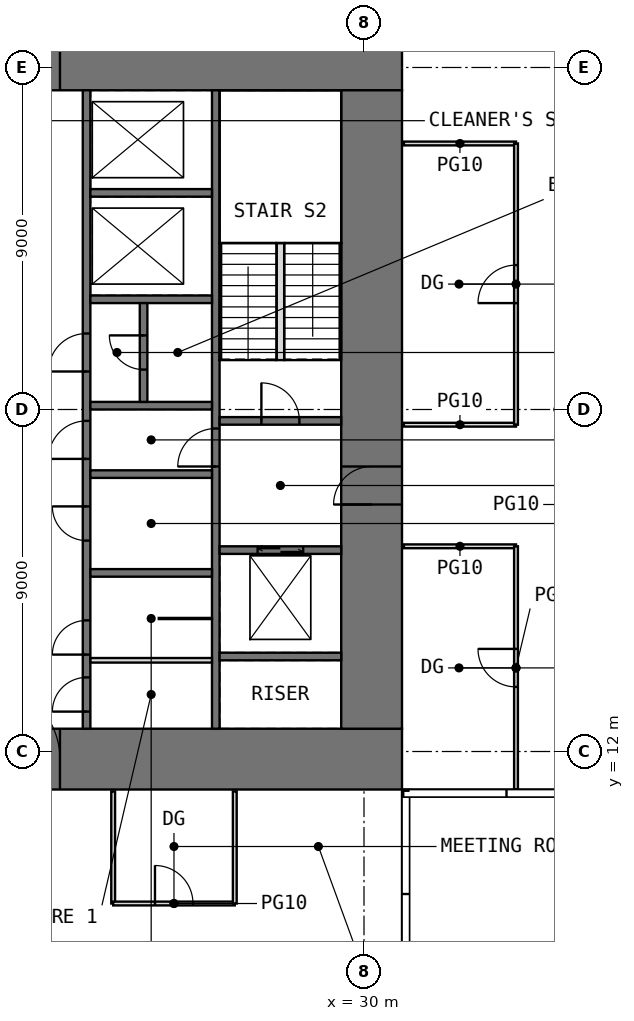
"""IFC4 building model, lengths in metres.
Left out: names, types, materials, properties, quantities, classifications, styles, units other than length and angle.
Written with IfcOpenShell. Run it as: python <this file> out.ifc"""

import sys

from ifc_helpers import new_model, si_unit, direction, frame, frame_2d, origin, place, context, subcontext, project, spatial, rectangle, extrude, element, fill, save


model = new_model("IFC4")
c1 = context("Model", 3, precision=1e-05, world=origin(), true_north=direction((0.0, 1.0)))
c2 = subcontext(c1, "Body", "Model", "MODEL_VIEW")
j1 = project(units=[si_unit("LENGTHUNIT", "METRE"), si_unit("PLANEANGLEUNIT", "RADIAN")], contexts=[c1])
p1 = place(None, origin())
s1 = spatial("IfcSite", under=j1, at=p1, CompositionType="ELEMENT")
p2 = place(p1, origin())
s2 = spatial("IfcBuilding", under=s1, at=p2, CompositionType="ELEMENT")
p3 = place(p2, frame((0.0, 0.0, 136.5)))
s3 = spatial("IfcBuildingStorey", under=s2, at=p3, CompositionType="ELEMENT", Elevation=136.5)
p4 = place(p3, frame((11.0, 11.8, -0.05), z_axis=(0.0, 0.0, 1.0), x_axis=(1.0, 0.0, 0.0)))
e1 = element("IfcWall", 1, at=p4, inside=s3, PredefinedType="SHEAR", context=c2, shape_type="SweptSolid", body=[
    extrude(rectangle(XDim=20.0, YDim=1.6, at=frame_2d((10.0, 0.0))), origin(), (0.0, 0.0, 1.0), 4.0),
])
p5 = place(p4, frame((9.0, 0.0, 0.05)))
e2 = element("IfcOpeningElement", 2, at=p5, cuts=e1, PredefinedType="OPENING", context=c2, shape_type="SweptSolid", body=[
    extrude(rectangle(XDim=2.0, YDim=2.2, at=frame_2d((1.0, 1.1))), frame((0.0, 0.81, 0.0), z_axis=(0.0, -1.0, 0.0), x_axis=(1.0, 0.0, 0.0)), (0.0, 0.0, 1.0), 1.62),
])
p6 = place(p3, frame((11.0, 30.2, -0.05), z_axis=(0.0, 0.0, 1.0), x_axis=(1.0, 0.0, 0.0)))
e3 = element("IfcWall", 3, at=p6, inside=s3, PredefinedType="SHEAR", context=c2, shape_type="SweptSolid", body=[
    extrude(rectangle(XDim=20.0, YDim=1.6, at=frame_2d((10.0, 0.0))), origin(), (0.0, 0.0, 1.0), 4.0),
])
p7 = place(p6, frame((9.0, 0.0, 0.05)))
e4 = element("IfcOpeningElement", 4, at=p7, cuts=e3, PredefinedType="OPENING", context=c2, shape_type="SweptSolid", body=[
    extrude(rectangle(XDim=2.0, YDim=2.2, at=frame_2d((1.0, 1.1))), frame((0.0, 0.81, 0.0), z_axis=(0.0, -1.0, 0.0), x_axis=(1.0, 0.0, 0.0)), (0.0, 0.0, 1.0), 1.62),
])
p8 = place(p3, frame((30.2, 12.6, -0.05), z_axis=(0.0, 0.0, 1.0), x_axis=(0.0, 1.0, 0.0)))
e5 = element("IfcWall", 5, at=p8, inside=s3, PredefinedType="SHEAR", context=c2, shape_type="SweptSolid", body=[
    extrude(rectangle(XDim=16.8, YDim=1.6, at=frame_2d((8.4, 0.0))), origin(), (0.0, 0.0, 1.0), 4.0),
])
p9 = place(p8, frame((5.9, 0.0, 0.05)))
e6 = element("IfcOpeningElement", 6, at=p9, cuts=e5, PredefinedType="OPENING", context=c2, shape_type="SweptSolid", body=[
    extrude(rectangle(XDim=1.0, YDim=2.2, at=frame_2d((0.5, 1.1))), frame((0.0, 0.81, 0.0), z_axis=(0.0, -1.0, 0.0), x_axis=(1.0, 0.0, 0.0)), (0.0, 0.0, 1.0), 1.62),
])
p10 = place(p3, frame((22.7, 12.6, -0.05), z_axis=(0.0, 0.0, 1.0), x_axis=(0.0, 1.0, 0.0)))
e7 = element("IfcWall", 7, at=p10, inside=s3, PredefinedType="SHEAR", context=c2, shape_type="SweptSolid", body=[
    extrude(rectangle(XDim=16.8, YDim=0.2, at=frame_2d((8.4, 0.0))), origin(), (0.0, 0.0, 1.0), 4.0),
])
p11 = place(p10, frame((0.45, 0.0, 0.05)))
e8 = element("IfcOpeningElement", 8, at=p11, cuts=e7, PredefinedType="OPENING", context=c2, shape_type="SweptSolid", body=[
    extrude(rectangle(XDim=0.9, YDim=2.2, at=frame_2d((0.45, 1.1))), frame((0.0, 0.11, 0.0), z_axis=(0.0, -1.0, 0.0), x_axis=(1.0, 0.0, 0.0)), (0.0, 0.0, 1.0), 0.22),
])
p12 = place(p10, frame((7.1, 0.0, 0.05)))
e9 = element("IfcOpeningElement", 9, at=p12, cuts=e7, PredefinedType="OPENING", context=c2, shape_type="SweptSolid", body=[
    extrude(rectangle(XDim=1.0, YDim=2.2, at=frame_2d((0.5, 1.1))), frame((0.0, 0.11, 0.0), z_axis=(0.0, -1.0, 0.0), x_axis=(1.0, 0.0, 0.0)), (0.0, 0.0, 1.0), 0.22),
])
p13 = place(p10, frame((1.95, 0.0, 0.05)))
e10 = element("IfcOpeningElement", 10, at=p13, cuts=e7, PredefinedType="OPENING", context=c2, shape_type="SweptSolid", body=[
    extrude(rectangle(XDim=0.9, YDim=2.2, at=frame_2d((0.45, 1.1))), frame((0.0, 0.11, 0.0), z_axis=(0.0, -1.0, 0.0), x_axis=(1.0, 0.0, 0.0)), (0.0, 0.0, 1.0), 0.22),
])
p14 = place(p10, frame((4.95, 0.0, 0.05)))
e11 = element("IfcOpeningElement", 11, at=p14, cuts=e7, PredefinedType="OPENING", context=c2, shape_type="SweptSolid", body=[
    extrude(rectangle(XDim=0.9, YDim=2.2, at=frame_2d((0.45, 1.1))), frame((0.0, 0.11, 0.0), z_axis=(0.0, -1.0, 0.0), x_axis=(1.0, 0.0, 0.0)), (0.0, 0.0, 1.0), 0.22),
])
p15 = place(p10, frame((9.4, 0.0, 0.05)))
e12 = element("IfcOpeningElement", 12, at=p15, cuts=e7, PredefinedType="OPENING", context=c2, shape_type="SweptSolid", body=[
    extrude(rectangle(XDim=1.0, YDim=2.2, at=frame_2d((0.5, 1.1))), frame((0.0, 0.11, 0.0), z_axis=(0.0, -1.0, 0.0), x_axis=(1.0, 0.0, 0.0)), (0.0, 0.0, 1.0), 0.22),
])
p16 = place(p3, frame((26.1, 12.6, -0.05), z_axis=(0.0, 0.0, 1.0), x_axis=(0.0, 1.0, 0.0)))
e13 = element("IfcWall", 13, at=p16, inside=s3, PredefinedType="SHEAR", context=c2, shape_type="SweptSolid", body=[
    extrude(rectangle(XDim=16.8, YDim=0.2, at=frame_2d((8.4, 0.0))), origin(), (0.0, 0.0, 1.0), 4.0),
])
p17 = place(p16, frame((6.9, 0.0, 0.05)))
e14 = element("IfcOpeningElement", 14, at=p17, cuts=e13, PredefinedType="OPENING", context=c2, shape_type="SweptSolid", body=[
    extrude(rectangle(XDim=1.0, YDim=2.2, at=frame_2d((0.5, 1.1))), frame((0.0, 0.11, 0.0), z_axis=(0.0, -1.0, 0.0), x_axis=(1.0, 0.0, 0.0)), (0.0, 0.0, 1.0), 0.22),
])
for number, where, z_axis, x_axis in (
    (15, (22.8, 16.7, -0.05), (0.0, 0.0, 1.0), (1.0, 0.0, 0.0)),
    (16, (22.8, 19.3, -0.05), (0.0, 0.0, 1.0), (1.0, 0.0, 0.0)),
    (17, (22.8, 21.1, -0.05), (0.0, 0.0, 1.0), (1.0, 0.0, 0.0)),
    (18, (22.8, 23.9, -0.05), (0.0, 0.0, 1.0), (1.0, 0.0, 0.0)),
    (19, (22.8, 26.7, -0.05), (0.0, 0.0, 1.0), (1.0, 0.0, 0.0)),
    (20, (26.2, 14.5, -0.05), (0.0, 0.0, 1.0), (1.0, 0.0, 0.0)),
):
    element("IfcWall", number, at=place(p3, frame(where, z_axis=z_axis, x_axis=x_axis)), inside=s3, PredefinedType="SHEAR", context=c2, shape_type="SweptSolid", body=[
        extrude(rectangle(XDim=3.2, YDim=0.2, at=frame_2d((1.6, 0.0))), origin(), (0.0, 0.0, 1.0), 4.0),
    ])
p18 = place(p3, frame((26.2, 17.3, -0.05), z_axis=(0.0, 0.0, 1.0), x_axis=(1.0, 0.0, 0.0)))
e21 = element("IfcWall", 21, at=p18, inside=s3, PredefinedType="SHEAR", context=c2, shape_type="SweptSolid", body=[
    extrude(rectangle(XDim=3.2, YDim=0.2, at=frame_2d((1.6, 0.0))), origin(), (0.0, 0.0, 1.0), 4.0),
])
p19 = place(p18, frame((1.0, 0.0, 0.05)))
e22 = element("IfcOpeningElement", 22, at=p19, cuts=e21, PredefinedType="OPENING", context=c2, shape_type="SweptSolid", body=[
    extrude(rectangle(XDim=1.2, YDim=2.2, at=frame_2d((0.6, 1.1))), frame((0.0, 0.11, 0.0), z_axis=(0.0, -1.0, 0.0), x_axis=(1.0, 0.0, 0.0)), (0.0, 0.0, 1.0), 0.22),
])
p20 = place(p3, frame((26.2, 20.7, -0.05), z_axis=(0.0, 0.0, 1.0), x_axis=(1.0, 0.0, 0.0)))
e23 = element("IfcWall", 23, at=p20, inside=s3, PredefinedType="SHEAR", context=c2, shape_type="SweptSolid", body=[
    extrude(rectangle(XDim=3.2, YDim=0.2, at=frame_2d((1.6, 0.0))), origin(), (0.0, 0.0, 1.0), 4.0),
])
p21 = place(p20, frame((1.1, 0.0, 0.05)))
e24 = element("IfcOpeningElement", 24, at=p21, cuts=e23, PredefinedType="OPENING", context=c2, shape_type="SweptSolid", body=[
    extrude(rectangle(XDim=1.0, YDim=2.2, at=frame_2d((0.5, 1.1))), frame((0.0, 0.11, 0.0), z_axis=(0.0, -1.0, 0.0), x_axis=(1.0, 0.0, 0.0)), (0.0, 0.0, 1.0), 0.22),
])
p22 = place(p3, frame((22.8, 14.4, 0.0), z_axis=(0.0, 0.0, 1.0), x_axis=(1.0, 0.0, 0.0)))
e25 = element("IfcWall", 25, at=p22, inside=s3, PredefinedType="PARTITIONING", context=c2, shape_type="SweptSolid", body=[
    extrude(rectangle(XDim=3.2, YDim=0.12, at=frame_2d((1.6, 0.0))), origin(), (0.0, 0.0, 1.0), 3.75),
])
p23 = place(p3, frame((24.6, 15.5, 0.0), z_axis=(0.0, 0.0, 1.0), x_axis=(1.0, 0.0, 0.0)))
e26 = element("IfcWall", 26, at=p23, inside=s3, PredefinedType="PARTITIONING", context=c2, shape_type="SweptSolid", body=[
    extrude(rectangle(XDim=1.4, YDim=0.03, at=frame_2d((0.7, 0.0))), origin(), (0.0, 0.0, 1.0), 3.75),
])
p24 = place(p3, frame((24.2, 21.2, -0.05), z_axis=(0.0, 0.0, 1.0), x_axis=(0.0, 1.0, 0.0)))
e27 = element("IfcWall", 27, at=p24, inside=s3, PredefinedType="SHEAR", context=c2, shape_type="SweptSolid", body=[
    extrude(rectangle(XDim=2.6, YDim=0.2, at=frame_2d((1.3, 0.0))), origin(), (0.0, 0.0, 1.0), 4.0),
])
p25 = place(p24, frame((0.85, 0.0, 0.05)))
e28 = element("IfcOpeningElement", 28, at=p25, cuts=e27, PredefinedType="OPENING", context=c2, shape_type="SweptSolid", body=[
    extrude(rectangle(XDim=0.9, YDim=2.2, at=frame_2d((0.45, 1.1))), frame((0.0, 0.11, 0.0), z_axis=(0.0, -1.0, 0.0), x_axis=(1.0, 0.0, 0.0)), (0.0, 0.0, 1.0), 0.22),
])
p26 = place(p3, frame((23.4, 8.0, 0.0), z_axis=(0.0, 0.0, 1.0), x_axis=(0.0, 1.0, 0.0)))
e29 = element("IfcWall", 29, at=p26, inside=s3, PredefinedType="PARTITIONING", context=c2, shape_type="SweptSolid", body=[
    extrude(rectangle(XDim=2.95, YDim=0.1, at=frame_2d((1.475, 0.0))), origin(), (0.0, 0.0, 1.0), 3.75),
])
p27 = place(p3, frame((23.4, 8.0, 0.0), z_axis=(0.0, 0.0, 1.0), x_axis=(1.0, 0.0, 0.0)))
e30 = element("IfcWall", 30, at=p27, inside=s3, PredefinedType="PARTITIONING", context=c2, shape_type="SweptSolid", body=[
    extrude(rectangle(XDim=3.2, YDim=0.1, at=frame_2d((1.6, 0.0))), origin(), (0.0, 0.0, 1.0), 3.75),
])
p28 = place(p27, frame((1.1, 0.0, 0.0)))
e31 = element("IfcOpeningElement", 31, at=p28, cuts=e30, PredefinedType="OPENING", context=c2, shape_type="SweptSolid", body=[
    extrude(rectangle(XDim=1.0, YDim=2.4, at=frame_2d((0.5, 1.2))), frame((0.0, 0.06, 0.0), z_axis=(0.0, -1.0, 0.0), x_axis=(1.0, 0.0, 0.0)), (0.0, 0.0, 1.0), 0.12),
])
for number, where, z_axis, x_axis in (
    (32, (26.6, 8.0, 0.0), (0.0, 0.0, 1.0), (0.0, 1.0, 0.0)),
    (33, (31.05, 17.4, 0.0), (0.0, 0.0, 1.0), (1.0, 0.0, 0.0)),
    (34, (31.05, 20.6, 0.0), (0.0, 0.0, 1.0), (1.0, 0.0, 0.0)),
    (35, (31.05, 28.0, 0.0), (0.0, 0.0, 1.0), (1.0, 0.0, 0.0)),
):
    element("IfcWall", number, at=place(p3, frame(where, z_axis=z_axis, x_axis=x_axis)), inside=s3, PredefinedType="PARTITIONING", context=c2, shape_type="SweptSolid", body=[
        extrude(rectangle(XDim=2.95, YDim=0.1, at=frame_2d((1.475, 0.0))), origin(), (0.0, 0.0, 1.0), 3.75),
    ])
p29 = place(p3, frame((34.0, 11.0, 0.0), z_axis=(0.0, 0.0, 1.0), x_axis=(0.0, 1.0, 0.0)))
e36 = element("IfcWall", 36, at=p29, inside=s3, PredefinedType="PARTITIONING", context=c2, shape_type="SweptSolid", body=[
    extrude(rectangle(XDim=6.4, YDim=0.1, at=frame_2d((3.2, 0.0))), origin(), (0.0, 0.0, 1.0), 3.75),
])
p30 = place(p29, frame((2.7, 0.0, 0.0)))
e37 = element("IfcOpeningElement", 37, at=p30, cuts=e36, PredefinedType="OPENING", context=c2, shape_type="SweptSolid", body=[
    extrude(rectangle(XDim=1.0, YDim=2.4, at=frame_2d((0.5, 1.2))), frame((0.0, 0.06, 0.0), z_axis=(0.0, -1.0, 0.0), x_axis=(1.0, 0.0, 0.0)), (0.0, 0.0, 1.0), 0.12),
])
p31 = place(p3, frame((34.0, 20.6, 0.0), z_axis=(0.0, 0.0, 1.0), x_axis=(0.0, 1.0, 0.0)))
e38 = element("IfcWall", 38, at=p31, inside=s3, PredefinedType="PARTITIONING", context=c2, shape_type="SweptSolid", body=[
    extrude(rectangle(XDim=7.4, YDim=0.1, at=frame_2d((3.7, 0.0))), origin(), (0.0, 0.0, 1.0), 3.75),
])
p32 = place(p31, frame((3.2, 0.0, 0.0)))
e39 = element("IfcOpeningElement", 39, at=p32, cuts=e38, PredefinedType="OPENING", context=c2, shape_type="SweptSolid", body=[
    extrude(rectangle(XDim=1.0, YDim=2.4, at=frame_2d((0.5, 1.2))), frame((0.0, 0.06, 0.0), z_axis=(0.0, -1.0, 0.0), x_axis=(1.0, 0.0, 0.0)), (0.0, 0.0, 1.0), 0.12),
])
p33 = place(p3, frame((27.8, 22.3, 0.0), z_axis=(0.0, 0.0, 1.0), x_axis=(0.0, 1.0, 0.0)))
e40 = element("IfcWall", 40, at=p33, inside=s3, PredefinedType="PARTITIONING", context=c2, shape_type="SweptSolid", body=[
    extrude(rectangle(XDim=3.08, YDim=0.2, at=frame_2d((1.54, 0.0))), origin(), (0.0, 0.0, 1.0), 4.0),
])
p34 = place(p5, origin())
e41 = element("IfcDoor", 41, at=p34, inside=s3, OperationType="DOUBLE_DOOR_SINGLE_SWING", PredefinedType="DOOR", context=c2, shape_type="SweptSolid", body=[
    extrude(rectangle(XDim=2.0, YDim=2.2, at=frame_2d((1.0, 1.1))), frame((0.0, 0.025, 0.0), z_axis=(0.0, -1.0, 0.0), x_axis=(1.0, 0.0, 0.0)), (0.0, 0.0, 1.0), 0.05),
])
fill(e2, e41)
p35 = place(p7, origin())
e42 = element("IfcDoor", 42, at=p35, inside=s3, OperationType="DOUBLE_DOOR_SINGLE_SWING", PredefinedType="DOOR", context=c2, shape_type="SweptSolid", body=[
    extrude(rectangle(XDim=2.0, YDim=2.2, at=frame_2d((1.0, 1.1))), frame((0.0, 0.025, 0.0), z_axis=(0.0, -1.0, 0.0), x_axis=(1.0, 0.0, 0.0)), (0.0, 0.0, 1.0), 0.05),
])
fill(e4, e42)
p36 = place(p11, origin())
e43 = element("IfcDoor", 43, at=p36, inside=s3, OperationType="SINGLE_SWING_LEFT", PredefinedType="DOOR", context=c2, shape_type="SweptSolid", body=[
    extrude(rectangle(XDim=0.9, YDim=2.2, at=frame_2d((0.45, 1.1))), frame((0.0, 0.025, 0.0), z_axis=(0.0, -1.0, 0.0), x_axis=(1.0, 0.0, 0.0)), (0.0, 0.0, 1.0), 0.05),
])
fill(e8, e43)
p37 = place(p9, origin())
e44 = element("IfcDoor", 44, at=p37, inside=s3, OperationType="SINGLE_SWING_LEFT", PredefinedType="DOOR", context=c2, shape_type="SweptSolid", body=[
    extrude(rectangle(XDim=1.0, YDim=2.2, at=frame_2d((0.5, 1.1))), frame((0.0, 0.025, 0.0), z_axis=(0.0, -1.0, 0.0), x_axis=(1.0, 0.0, 0.0)), (0.0, 0.0, 1.0), 0.05),
])
fill(e6, e44)
p38 = place(p21, origin())
e45 = element("IfcDoor", 45, at=p38, inside=s3, OperationType="SINGLE_SWING_LEFT", PredefinedType="DOOR", context=c2, shape_type="SweptSolid", body=[
    extrude(rectangle(XDim=1.0, YDim=2.2, at=frame_2d((0.5, 1.1))), frame((0.0, 0.025, 0.0), z_axis=(0.0, -1.0, 0.0), x_axis=(1.0, 0.0, 0.0)), (0.0, 0.0, 1.0), 0.05),
])
fill(e24, e45)
p39 = place(p17, origin())
e46 = element("IfcDoor", 46, at=p39, inside=s3, OperationType="SINGLE_SWING_LEFT", PredefinedType="DOOR", context=c2, shape_type="SweptSolid", body=[
    extrude(rectangle(XDim=1.0, YDim=2.2, at=frame_2d((0.5, 1.1))), frame((0.0, 0.025, 0.0), z_axis=(0.0, -1.0, 0.0), x_axis=(1.0, 0.0, 0.0)), (0.0, 0.0, 1.0), 0.05),
])
fill(e14, e46)
p40 = place(p12, origin())
e47 = element("IfcDoor", 47, at=p40, inside=s3, OperationType="SINGLE_SWING_LEFT", PredefinedType="DOOR", context=c2, shape_type="SweptSolid", body=[
    extrude(rectangle(XDim=1.0, YDim=2.2, at=frame_2d((0.5, 1.1))), frame((0.0, 0.025, 0.0), z_axis=(0.0, -1.0, 0.0), x_axis=(1.0, 0.0, 0.0)), (0.0, 0.0, 1.0), 0.05),
])
fill(e9, e47)
p41 = place(p13, origin())
e48 = element("IfcDoor", 48, at=p41, inside=s3, OperationType="SINGLE_SWING_LEFT", PredefinedType="DOOR", context=c2, shape_type="SweptSolid", body=[
    extrude(rectangle(XDim=0.9, YDim=2.2, at=frame_2d((0.45, 1.1))), frame((0.0, 0.025, 0.0), z_axis=(0.0, -1.0, 0.0), x_axis=(1.0, 0.0, 0.0)), (0.0, 0.0, 1.0), 0.05),
])
fill(e10, e48)
p42 = place(p14, origin())
e49 = element("IfcDoor", 49, at=p42, inside=s3, OperationType="SINGLE_SWING_RIGHT", PredefinedType="DOOR", context=c2, shape_type="SweptSolid", body=[
    extrude(rectangle(XDim=0.9, YDim=2.2, at=frame_2d((0.45, 1.1))), frame((0.0, 0.025, 0.0), z_axis=(0.0, -1.0, 0.0), x_axis=(1.0, 0.0, 0.0)), (0.0, 0.0, 1.0), 0.05),
])
fill(e11, e49)
p43 = place(p15, origin())
e50 = element("IfcDoor", 50, at=p43, inside=s3, OperationType="SINGLE_SWING_LEFT", PredefinedType="DOOR", context=c2, shape_type="SweptSolid", body=[
    extrude(rectangle(XDim=1.0, YDim=2.2, at=frame_2d((0.5, 1.1))), frame((0.0, 0.025, 0.0), z_axis=(0.0, -1.0, 0.0), x_axis=(1.0, 0.0, 0.0)), (0.0, 0.0, 1.0), 0.05),
])
fill(e12, e50)
p44 = place(p25, origin())
e51 = element("IfcDoor", 51, at=p44, inside=s3, OperationType="SINGLE_SWING_RIGHT", PredefinedType="DOOR", context=c2, shape_type="SweptSolid", body=[
    extrude(rectangle(XDim=0.9, YDim=2.2, at=frame_2d((0.45, 1.1))), frame((0.0, 0.025, 0.0), z_axis=(0.0, -1.0, 0.0), x_axis=(1.0, 0.0, 0.0)), (0.0, 0.0, 1.0), 0.05),
])
fill(e28, e51)
p45 = place(p28, origin())
e52 = element("IfcDoor", 52, at=p45, inside=s3, OperationType="SINGLE_SWING_LEFT", PredefinedType="DOOR", context=c2, shape_type="SweptSolid", body=[
    extrude(rectangle(XDim=1.0, YDim=2.4, at=frame_2d((0.5, 1.2))), frame((0.0, 0.025, 0.0), z_axis=(0.0, -1.0, 0.0), x_axis=(1.0, 0.0, 0.0)), (0.0, 0.0, 1.0), 0.05),
])
fill(e31, e52)
p46 = place(p30, origin())
e53 = element("IfcDoor", 53, at=p46, inside=s3, OperationType="SINGLE_SWING_RIGHT", PredefinedType="DOOR", context=c2, shape_type="SweptSolid", body=[
    extrude(rectangle(XDim=1.0, YDim=2.4, at=frame_2d((0.5, 1.2))), frame((0.0, 0.025, 0.0), z_axis=(0.0, -1.0, 0.0), x_axis=(1.0, 0.0, 0.0)), (0.0, 0.0, 1.0), 0.05),
])
fill(e37, e53)
p47 = place(p32, origin())
e54 = element("IfcDoor", 54, at=p47, inside=s3, OperationType="SINGLE_SWING_LEFT", PredefinedType="DOOR", context=c2, shape_type="SweptSolid", body=[
    extrude(rectangle(XDim=1.0, YDim=2.4, at=frame_2d((0.5, 1.2))), frame((0.0, 0.025, 0.0), z_axis=(0.0, -1.0, 0.0), x_axis=(1.0, 0.0, 0.0)), (0.0, 0.0, 1.0), 0.05),
])
fill(e39, e54)
p48 = place(p19, origin())
e55 = element("IfcDoor", 55, at=p48, inside=s3, OperationType="DOUBLE_DOOR_SLIDING", PredefinedType="DOOR", context=c2, shape_type="SweptSolid", body=[
    extrude(rectangle(XDim=1.2, YDim=2.2, at=frame_2d((0.6, 1.1))), frame((0.0, 0.025, 0.0), z_axis=(0.0, -1.0, 0.0), x_axis=(1.0, 0.0, 0.0)), (0.0, 0.0, 1.0), 0.05),
])
fill(e22, e55)
save(model, sys.argv[1])
